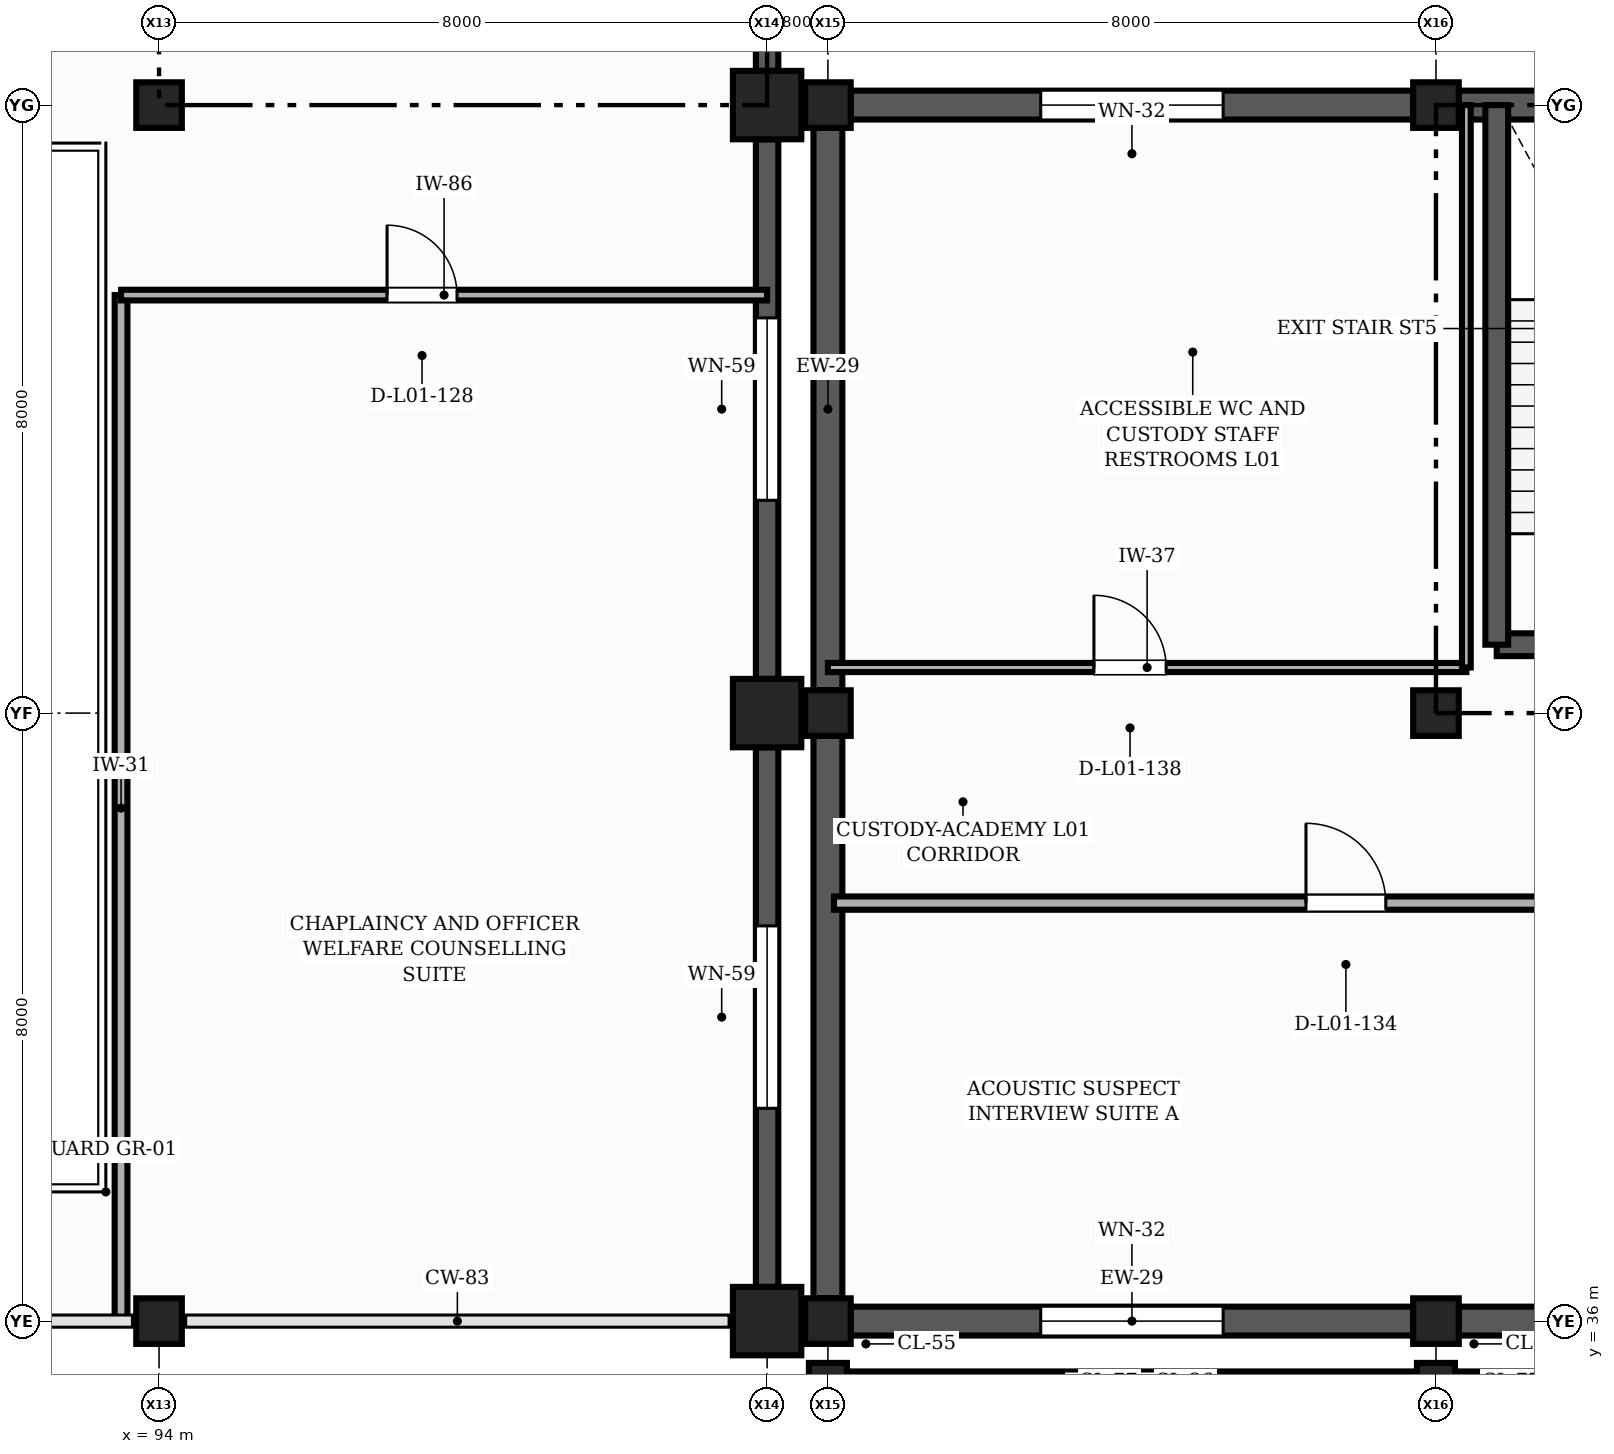
"""IFC4 building model, lengths in metres.
Left out: names, types, materials, properties, quantities, classifications, styles, units other than length and angle.
Written with IfcOpenShell. Run it as: python <this file> out.ifc"""

import sys

from ifc_helpers import new_model, si_unit, direction, frame, frame_2d, origin, origin_2d, place, context, subcontext, project, spatial, polyline, rectangle, outline, extrude, element, fill, save


model = new_model("IFC4")
c1 = context("Model", 3, precision=1e-05, world=origin(), true_north=direction((0.0, 1.0)))
c2 = subcontext(c1, "Body", "Model", "MODEL_VIEW")
j1 = project(units=[si_unit("LENGTHUNIT", "METRE"), si_unit("PLANEANGLEUNIT", "RADIAN")], contexts=[c1])
p1 = place(None, origin())
s1 = spatial("IfcSite", under=j1, at=p1, CompositionType="ELEMENT")
p2 = place(p1, origin())
s2 = spatial("IfcBuilding", under=s1, at=p2, CompositionType="ELEMENT")
p3 = place(p2, frame((0.0, 0.0, 4.8)))
s3 = spatial("IfcBuildingStorey", under=s2, at=p3, CompositionType="ELEMENT", Elevation=4.8)
for number, where, z_axis, x_axis in (
    (1, (94.0, 36.0, 0.0), (0.0, 0.0, 1.0), (1.0, 0.0, 0.0)),
    (2, (94.0, 52.0, 0.0), (0.0, 0.0, 1.0), (1.0, 0.0, 0.0)),
):
    element("IfcColumn", number, at=place(p3, frame(where, z_axis=z_axis, x_axis=x_axis)), inside=s3, PredefinedType="COLUMN", context=c2, shape_type="SweptSolid", body=[
        extrude(rectangle(XDim=0.6, YDim=0.6, at=origin_2d()), origin(), (0.0, 0.0, 1.0), 4.2),
    ])
for number, where, z_axis, x_axis in (
    (3, (102.0, 36.0, 0.0), (0.0, 0.0, 1.0), (1.0, 0.0, 0.0)),
    (4, (102.0, 44.0, 0.0), (0.0, 0.0, 1.0), (1.0, 0.0, 0.0)),
    (5, (102.0, 52.0, 0.0), (0.0, 0.0, 1.0), (1.0, 0.0, 0.0)),
):
    element("IfcColumn", number, at=place(p3, frame(where, z_axis=z_axis, x_axis=x_axis)), inside=s3, PredefinedType="COLUMN", context=c2, shape_type="SweptSolid", body=[
        extrude(rectangle(XDim=0.9, YDim=0.9, at=origin_2d()), origin(), (0.0, 0.0, 1.0), 4.2),
    ])
p4 = place(p3, frame((102.8, 35.2, 0.0), z_axis=(0.0, 0.0, 1.0), x_axis=(1.0, 0.0, 0.0)))
e6 = element("IfcColumn", 6, at=p4, inside=s3, PredefinedType="COLUMN", context=c2, shape_type="SweptSolid", body=[
    extrude(rectangle(XDim=0.5, YDim=0.5, at=origin_2d()), origin(), (0.0, 0.0, 1.0), 4.2),
])
for number, where, z_axis, x_axis in (
    (7, (102.8, 36.0, 0.0), (0.0, 0.0, 1.0), (1.0, 0.0, 0.0)),
    (8, (102.8, 44.0, 0.0), (0.0, 0.0, 1.0), (1.0, 0.0, 0.0)),
    (9, (102.8, 52.0, 0.0), (0.0, 0.0, 1.0), (1.0, 0.0, 0.0)),
):
    element("IfcColumn", number, at=place(p3, frame(where, z_axis=z_axis, x_axis=x_axis)), inside=s3, PredefinedType="COLUMN", context=c2, shape_type="SweptSolid", body=[
        extrude(rectangle(XDim=0.6, YDim=0.6, at=origin_2d()), origin(), (0.0, 0.0, 1.0), 4.2),
    ])
p5 = place(p3, frame((110.8, 35.2, 0.0), z_axis=(0.0, 0.0, 1.0), x_axis=(1.0, 0.0, 0.0)))
e10 = element("IfcColumn", 10, at=p5, inside=s3, PredefinedType="COLUMN", context=c2, shape_type="SweptSolid", body=[
    extrude(rectangle(XDim=0.5, YDim=0.5, at=origin_2d()), origin(), (0.0, 0.0, 1.0), 4.2),
])
for number, where, z_axis, x_axis in (
    (11, (110.8, 36.0, 0.0), (0.0, 0.0, 1.0), (1.0, 0.0, 0.0)),
    (12, (110.8, 44.0, 0.0), (0.0, 0.0, 1.0), (1.0, 0.0, 0.0)),
    (13, (110.8, 52.0, 0.0), (0.0, 0.0, 1.0), (1.0, 0.0, 0.0)),
):
    element("IfcColumn", number, at=place(p3, frame(where, z_axis=z_axis, x_axis=x_axis)), inside=s3, PredefinedType="COLUMN", context=c2, shape_type="SweptSolid", body=[
        extrude(rectangle(XDim=0.6, YDim=0.6, at=origin_2d()), origin(), (0.0, 0.0, 1.0), 4.2),
    ])
p6 = place(p3, frame((102.0, 36.45, 0.0), z_axis=(0.0, 0.0, 1.0), x_axis=(0.0, 1.0, 0.0)))
e14 = element("IfcWall", 14, at=p6, inside=s3, PredefinedType="SOLIDWALL", context=c2, shape_type="SweptSolid", body=[
    extrude(rectangle(XDim=7.1, YDim=0.295, at=frame_2d((3.55, 0.0))), origin(), (0.0, 0.0, 1.0), 3.91),
])
p7 = place(p6, frame((2.35, 0.0, 0.9)))
e15 = element("IfcOpeningElement", 15, at=p7, cuts=e14, PredefinedType="OPENING", context=c2, shape_type="SweptSolid", body=[
    extrude(rectangle(XDim=2.4, YDim=1.5, at=frame_2d((1.2, 0.75))), frame((0.0, 0.157, 0.0), z_axis=(0.0, -1.0, 0.0), x_axis=(1.0, 0.0, 0.0)), (0.0, 0.0, 1.0), 0.315),
])
p8 = place(p3, frame((102.0, 44.45, 0.0), z_axis=(0.0, 0.0, 1.0), x_axis=(0.0, 1.0, 0.0)))
e16 = element("IfcWall", 16, at=p8, inside=s3, PredefinedType="SOLIDWALL", context=c2, shape_type="SweptSolid", body=[
    extrude(rectangle(XDim=7.1, YDim=0.295, at=frame_2d((3.55, 0.0))), origin(), (0.0, 0.0, 1.0), 3.91),
])
p9 = place(p8, frame((2.35, 0.0, 0.9)))
e17 = element("IfcOpeningElement", 17, at=p9, cuts=e16, PredefinedType="OPENING", context=c2, shape_type="SweptSolid", body=[
    extrude(rectangle(XDim=2.4, YDim=1.5, at=frame_2d((1.2, 0.75))), frame((0.0, 0.157, 0.0), z_axis=(0.0, -1.0, 0.0), x_axis=(1.0, 0.0, 0.0)), (0.0, 0.0, 1.0), 0.315),
])
p10 = place(p3, frame((102.0, 52.45, 0.0), z_axis=(0.0, 0.0, 1.0), x_axis=(0.0, 1.0, 0.0)))
e18 = element("IfcWall", 18, at=p10, inside=s3, PredefinedType="SOLIDWALL", context=c2, shape_type="SweptSolid", body=[
    extrude(rectangle(XDim=7.1, YDim=0.295, at=frame_2d((3.55, 0.0))), origin(), (0.0, 0.0, 1.0), 3.91),
])
p11 = place(p10, frame((2.35, 0.0, 0.9)))
e19 = element("IfcOpeningElement", 19, at=p11, cuts=e18, PredefinedType="OPENING", context=c2, shape_type="SweptSolid", body=[
    extrude(rectangle(XDim=2.4, YDim=1.5, at=frame_2d((1.2, 0.75))), frame((0.0, 0.157, 0.0), z_axis=(0.0, -1.0, 0.0), x_axis=(1.0, 0.0, 0.0)), (0.0, 0.0, 1.0), 0.315),
])
p12 = place(p3, frame((118.55, 35.2, 0.0), z_axis=(0.0, 0.0, 1.0), x_axis=(-1.0, 0.0, 0.0)))
e20 = element("IfcWall", 20, at=p12, inside=s3, PredefinedType="SOLIDWALL", context=c2, shape_type="SweptSolid", body=[
    extrude(rectangle(XDim=7.5, YDim=0.275, at=frame_2d((3.75, 0.0))), origin(), (0.0, 0.0, 1.0), 3.91),
])
p13 = place(p3, frame((110.55, 35.2, 0.0), z_axis=(0.0, 0.0, 1.0), x_axis=(-1.0, 0.0, 0.0)))
e21 = element("IfcWall", 21, at=p13, inside=s3, PredefinedType="SOLIDWALL", context=c2, shape_type="SweptSolid", body=[
    extrude(rectangle(XDim=7.5, YDim=0.275, at=frame_2d((3.75, 0.0))), origin(), (0.0, 0.0, 1.0), 3.333),
])
p14 = place(p13, frame((2.85, 0.0, 1.6)))
e22 = element("IfcOpeningElement", 22, at=p14, cuts=e21, PredefinedType="OPENING", context=c2, shape_type="SweptSolid", body=[
    extrude(rectangle(XDim=1.8, YDim=0.75, at=frame_2d((0.9, 0.375))), frame((0.0, 0.147, 0.0), z_axis=(0.0, -1.0, 0.0), x_axis=(1.0, 0.0, 0.0)), (0.0, 0.0, 1.0), 0.295),
])
p15 = place(p3, frame((103.1, 36.0, 0.0), z_axis=(0.0, 0.0, 1.0), x_axis=(1.0, 0.0, 0.0)))
e23 = element("IfcWall", 23, at=p15, inside=s3, PredefinedType="SOLIDWALL", context=c2, shape_type="SweptSolid", body=[
    extrude(rectangle(XDim=7.4, YDim=0.38, at=frame_2d((3.7, 0.0))), origin(), (0.0, 0.0, 1.0), 3.16),
])
p16 = place(p15, frame((2.5, 0.0, 2.1)))
e24 = element("IfcOpeningElement", 24, at=p16, cuts=e23, PredefinedType="OPENING", context=c2, shape_type="SweptSolid", body=[
    extrude(rectangle(XDim=2.4, YDim=0.75, at=frame_2d((1.2, 0.375))), frame((0.0, 0.2, 0.0), z_axis=(0.0, -1.0, 0.0), x_axis=(1.0, 0.0, 0.0)), (0.0, 0.0, 1.0), 0.4),
])
p17 = place(p3, frame((111.1, 36.0, 0.0), z_axis=(0.0, 0.0, 1.0), x_axis=(1.0, 0.0, 0.0)))
e25 = element("IfcWall", 25, at=p17, inside=s3, PredefinedType="SOLIDWALL", context=c2, shape_type="SweptSolid", body=[
    extrude(rectangle(XDim=7.4, YDim=0.38, at=frame_2d((3.7, 0.0))), origin(), (0.0, 0.0, 1.0), 3.16),
])
p18 = place(p3, frame((118.5, 52.0, 0.0), z_axis=(0.0, 0.0, 1.0), x_axis=(-1.0, 0.0, 0.0)))
e26 = element("IfcWall", 26, at=p18, inside=s3, PredefinedType="SOLIDWALL", context=c2, shape_type="SweptSolid", body=[
    extrude(rectangle(XDim=7.4, YDim=0.38, at=frame_2d((3.7, 0.0))), origin(), (0.0, 0.0, 1.0), 3.91),
])
p19 = place(p3, frame((110.5, 52.0, 0.0), z_axis=(0.0, 0.0, 1.0), x_axis=(-1.0, 0.0, 0.0)))
e27 = element("IfcWall", 27, at=p19, inside=s3, PredefinedType="SOLIDWALL", context=c2, shape_type="SweptSolid", body=[
    extrude(rectangle(XDim=7.4, YDim=0.38, at=frame_2d((3.7, 0.0))), origin(), (0.0, 0.0, 1.0), 3.16),
])
p20 = place(p19, frame((2.5, 0.0, 2.1)))
e28 = element("IfcOpeningElement", 28, at=p20, cuts=e27, PredefinedType="OPENING", context=c2, shape_type="SweptSolid", body=[
    extrude(rectangle(XDim=2.4, YDim=0.75, at=frame_2d((1.2, 0.375))), frame((0.0, 0.2, 0.0), z_axis=(0.0, -1.0, 0.0), x_axis=(1.0, 0.0, 0.0)), (0.0, 0.0, 1.0), 0.4),
])
for number, where, z_axis, x_axis in (
    (29, (102.8, 51.7, 0.0), (0.0, 0.0, 1.0), (0.0, -1.0, 0.0)),
    (30, (102.8, 43.7, 0.0), (0.0, 0.0, 1.0), (0.0, -1.0, 0.0)),
):
    element("IfcWall", number, at=place(p3, frame(where, z_axis=z_axis, x_axis=x_axis)), inside=s3, PredefinedType="SOLIDWALL", context=c2, shape_type="SweptSolid", body=[
        extrude(rectangle(XDim=7.4, YDim=0.38, at=frame_2d((3.7, 0.0))), origin(), (0.0, 0.0, 1.0), 3.26),
    ])
p21 = place(p3, frame((102.8, 35.2, 4.2), z_axis=(0.0, 0.0, 1.0), x_axis=(1.0, 0.0, 0.0)))
e31 = element("IfcWall", 31, at=p21, inside=s3, PredefinedType="SOLIDWALL", context=c2, shape_type="SweptSolid", body=[
    extrude(outline(polyline([(0.0, 0.0), (16.0, 0.0), (16.0, 0.05), (8.0, 3.55), (0.0, 0.05), (0.0, 0.0)])), frame((0.0, 0.107, 0.0), z_axis=(0.0, -1.0, 0.0), x_axis=(1.0, 0.0, 0.0)), (0.0, 0.0, 1.0), 0.215),
])
p22 = place(p3, frame((111.6, 44.9, 0.0), z_axis=(0.0, 0.0, 1.0), x_axis=(1.0, 0.0, 0.0)))
e32 = element("IfcWall", 32, at=p22, inside=s3, PredefinedType="SHEAR", context=c2, shape_type="SweptSolid", body=[
    extrude(rectangle(XDim=3.12, YDim=0.3, at=frame_2d((1.56, 0.0))), origin(), (0.0, 0.0, 1.0), 4.2),
])
p23 = place(p22, frame((0.985, 0.0, 0.0)))
e33 = element("IfcOpeningElement", 33, at=p23, cuts=e32, PredefinedType="OPENING", context=c2, shape_type="SweptSolid", body=[
    extrude(rectangle(XDim=1.15, YDim=2.15, at=frame_2d((0.575, 1.075))), frame((0.0, 0.16, 0.0), z_axis=(0.0, -1.0, 0.0), x_axis=(1.0, 0.0, 0.0)), (0.0, 0.0, 1.0), 0.32),
])
p24 = place(p3, frame((111.6, 52.0, 0.0), z_axis=(0.0, 0.0, 1.0), x_axis=(0.0, -1.0, 0.0)))
e34 = element("IfcWall", 34, at=p24, inside=s3, PredefinedType="SHEAR", context=c2, shape_type="SweptSolid", body=[
    extrude(rectangle(XDim=7.1, YDim=0.3, at=frame_2d((3.55, 0.0))), origin(), (0.0, 0.0, 1.0), 4.2),
])
p25 = place(p3, frame((93.5, 36.0, 0.0), z_axis=(0.0, 0.0, 1.0), x_axis=(0.0, 1.0, 0.0)))
e35 = element("IfcWall", 35, at=p25, inside=s3, PredefinedType="PARTITIONING", context=c2, shape_type="SweptSolid", body=[
    extrude(rectangle(XDim=13.5, YDim=0.168, at=frame_2d((6.75, 0.0))), origin(), (0.0, 0.0, 1.0), 2.945),
])
p26 = place(p3, frame((93.5, 49.5, 0.0), z_axis=(0.0, 0.0, 1.0), x_axis=(1.0, 0.0, 0.0)))
e36 = element("IfcWall", 36, at=p26, inside=s3, PredefinedType="PARTITIONING", context=c2, shape_type="SweptSolid", body=[
    extrude(rectangle(XDim=8.5, YDim=0.14, at=frame_2d((4.25, 0.0))), origin(), (0.0, 0.0, 1.0), 2.945),
])
p27 = place(p26, frame((3.5, 0.0, 0.0)))
e37 = element("IfcOpeningElement", 37, at=p27, cuts=e36, PredefinedType="OPENING", context=c2, shape_type="SweptSolid", body=[
    extrude(rectangle(XDim=0.92, YDim=2.1, at=frame_2d((0.46, 1.05))), frame((0.0, 0.08, 0.0), z_axis=(0.0, -1.0, 0.0), x_axis=(1.0, 0.0, 0.0)), (0.0, 0.0, 1.0), 0.16),
])
p28 = place(p3, frame((102.88, 41.5, 0.0), z_axis=(0.0, 0.0, 1.0), x_axis=(1.0, 0.0, 0.0)))
e38 = element("IfcWall", 38, at=p28, inside=s3, PredefinedType="PARTITIONING", context=c2, shape_type="SweptSolid", body=[
    extrude(rectangle(XDim=55.84, YDim=0.175, at=frame_2d((27.92, 0.0))), origin(), (0.0, 0.0, 1.0), 3.195),
])
p29 = place(p28, frame((6.21, 0.0, 0.0)))
e39 = element("IfcOpeningElement", 39, at=p29, cuts=e38, PredefinedType="OPENING", context=c2, shape_type="SweptSolid", body=[
    extrude(rectangle(XDim=1.05, YDim=2.1, at=frame_2d((0.525, 1.05))), frame((0.0, 0.098, 0.0), z_axis=(0.0, -1.0, 0.0), x_axis=(1.0, 0.0, 0.0)), (0.0, 0.0, 1.0), 0.195),
])
p30 = place(p28, frame((19.54, 0.0, 0.0)))
e40 = element("IfcOpeningElement", 40, at=p30, cuts=e38, PredefinedType="OPENING", context=c2, shape_type="SweptSolid", body=[
    extrude(rectangle(XDim=1.05, YDim=2.1, at=frame_2d((0.525, 1.05))), frame((0.0, 0.098, 0.0), z_axis=(0.0, -1.0, 0.0), x_axis=(1.0, 0.0, 0.0)), (0.0, 0.0, 1.0), 0.195),
])
p31 = place(p28, frame((33.39, 0.0, 0.0)))
e41 = element("IfcOpeningElement", 41, at=p31, cuts=e38, PredefinedType="OPENING", context=c2, shape_type="SweptSolid", body=[
    extrude(rectangle(XDim=1.05, YDim=2.1, at=frame_2d((0.525, 1.05))), frame((0.0, 0.098, 0.0), z_axis=(0.0, -1.0, 0.0), x_axis=(1.0, 0.0, 0.0)), (0.0, 0.0, 1.0), 0.195),
])
p32 = place(p28, frame((47.84, 0.0, 0.0)))
e42 = element("IfcOpeningElement", 42, at=p32, cuts=e38, PredefinedType="OPENING", context=c2, shape_type="SweptSolid", body=[
    extrude(rectangle(XDim=1.05, YDim=2.1, at=frame_2d((0.525, 1.05))), frame((0.0, 0.098, 0.0), z_axis=(0.0, -1.0, 0.0), x_axis=(1.0, 0.0, 0.0)), (0.0, 0.0, 1.0), 0.195),
])
p33 = place(p3, frame((102.8, 44.6, 0.0), z_axis=(0.0, 0.0, 1.0), x_axis=(1.0, 0.0, 0.0)))
e43 = element("IfcWall", 43, at=p33, inside=s3, PredefinedType="PARTITIONING", context=c2, shape_type="SweptSolid", body=[
    extrude(rectangle(XDim=8.4, YDim=0.12, at=frame_2d((4.2, 0.0))), origin(), (0.0, 0.0, 1.0), 3.245),
])
p34 = place(p33, frame((3.5, 0.0, 0.0)))
e44 = element("IfcOpeningElement", 44, at=p34, cuts=e43, PredefinedType="OPENING", context=c2, shape_type="SweptSolid", body=[
    extrude(rectangle(XDim=0.95, YDim=2.15, at=frame_2d((0.475, 1.075))), frame((0.0, 0.07, 0.0), z_axis=(0.0, -1.0, 0.0), x_axis=(1.0, 0.0, 0.0)), (0.0, 0.0, 1.0), 0.14),
])
p35 = place(p3, frame((111.2, 44.6, 0.0), z_axis=(0.0, 0.0, 1.0), x_axis=(0.0, 1.0, 0.0)))
e45 = element("IfcWall", 45, at=p35, inside=s3, PredefinedType="PARTITIONING", context=c2, shape_type="SweptSolid", body=[
    extrude(rectangle(XDim=7.4, YDim=0.115, at=frame_2d((3.7, 0.0))), origin(), (0.0, 0.0, 1.0), 3.91),
])
p36 = place(p7, origin())
e46 = element("IfcWindow", 46, at=p36, inside=s3, PartitioningType="SINGLE_PANEL", PredefinedType="WINDOW", context=c2, shape_type="SweptSolid", body=[
    extrude(rectangle(XDim=2.4, YDim=1.5, at=frame_2d((1.2, 0.75))), frame((0.0, 0.03, 0.0), z_axis=(0.0, -1.0, 0.0), x_axis=(1.0, 0.0, 0.0)), (0.0, 0.0, 1.0), 0.06),
])
fill(e15, e46)
p37 = place(p9, origin())
e47 = element("IfcWindow", 47, at=p37, inside=s3, PartitioningType="SINGLE_PANEL", PredefinedType="WINDOW", context=c2, shape_type="SweptSolid", body=[
    extrude(rectangle(XDim=2.4, YDim=1.5, at=frame_2d((1.2, 0.75))), frame((0.0, 0.03, 0.0), z_axis=(0.0, -1.0, 0.0), x_axis=(1.0, 0.0, 0.0)), (0.0, 0.0, 1.0), 0.06),
])
fill(e17, e47)
p38 = place(p16, origin())
e48 = element("IfcWindow", 48, at=p38, inside=s3, PartitioningType="SINGLE_PANEL", PredefinedType="WINDOW", context=c2, shape_type="SweptSolid", body=[
    extrude(rectangle(XDim=2.4, YDim=0.75, at=frame_2d((1.2, 0.375))), frame((0.0, 0.03, 0.0), z_axis=(0.0, -1.0, 0.0), x_axis=(1.0, 0.0, 0.0)), (0.0, 0.0, 1.0), 0.06),
])
fill(e24, e48)
p39 = place(p20, origin())
e49 = element("IfcWindow", 49, at=p39, inside=s3, PartitioningType="SINGLE_PANEL", PredefinedType="WINDOW", context=c2, shape_type="SweptSolid", body=[
    extrude(rectangle(XDim=2.4, YDim=0.75, at=frame_2d((1.2, 0.375))), frame((0.0, 0.03, 0.0), z_axis=(0.0, -1.0, 0.0), x_axis=(1.0, 0.0, 0.0)), (0.0, 0.0, 1.0), 0.06),
])
fill(e28, e49)
p40 = place(p27, origin())
e50 = element("IfcDoor", 50, at=p40, inside=s3, OperationType="SINGLE_SWING_LEFT", PredefinedType="DOOR", context=c2, shape_type="SweptSolid", body=[
    extrude(rectangle(XDim=0.92, YDim=2.1, at=frame_2d((0.46, 1.05))), frame((0.0, 0.025, 0.0), z_axis=(0.0, -1.0, 0.0), x_axis=(1.0, 0.0, 0.0)), (0.0, 0.0, 1.0), 0.05),
])
fill(e37, e50)
p41 = place(p29, origin())
e51 = element("IfcDoor", 51, at=p41, inside=s3, OperationType="SINGLE_SWING_LEFT", PredefinedType="DOOR", context=c2, shape_type="SweptSolid", body=[
    extrude(rectangle(XDim=1.05, YDim=2.1, at=frame_2d((0.525, 1.05))), frame((0.0, 0.025, 0.0), z_axis=(0.0, -1.0, 0.0), x_axis=(1.0, 0.0, 0.0)), (0.0, 0.0, 1.0), 0.05),
])
fill(e39, e51)
p42 = place(p34, origin())
e52 = element("IfcDoor", 52, at=p42, inside=s3, OperationType="SINGLE_SWING_LEFT", PredefinedType="DOOR", context=c2, shape_type="SweptSolid", body=[
    extrude(rectangle(XDim=0.95, YDim=2.15, at=frame_2d((0.475, 1.075))), frame((0.0, 0.025, 0.0), z_axis=(0.0, -1.0, 0.0), x_axis=(1.0, 0.0, 0.0)), (0.0, 0.0, 1.0), 0.05),
])
fill(e44, e52)
save(model, sys.argv[1])
